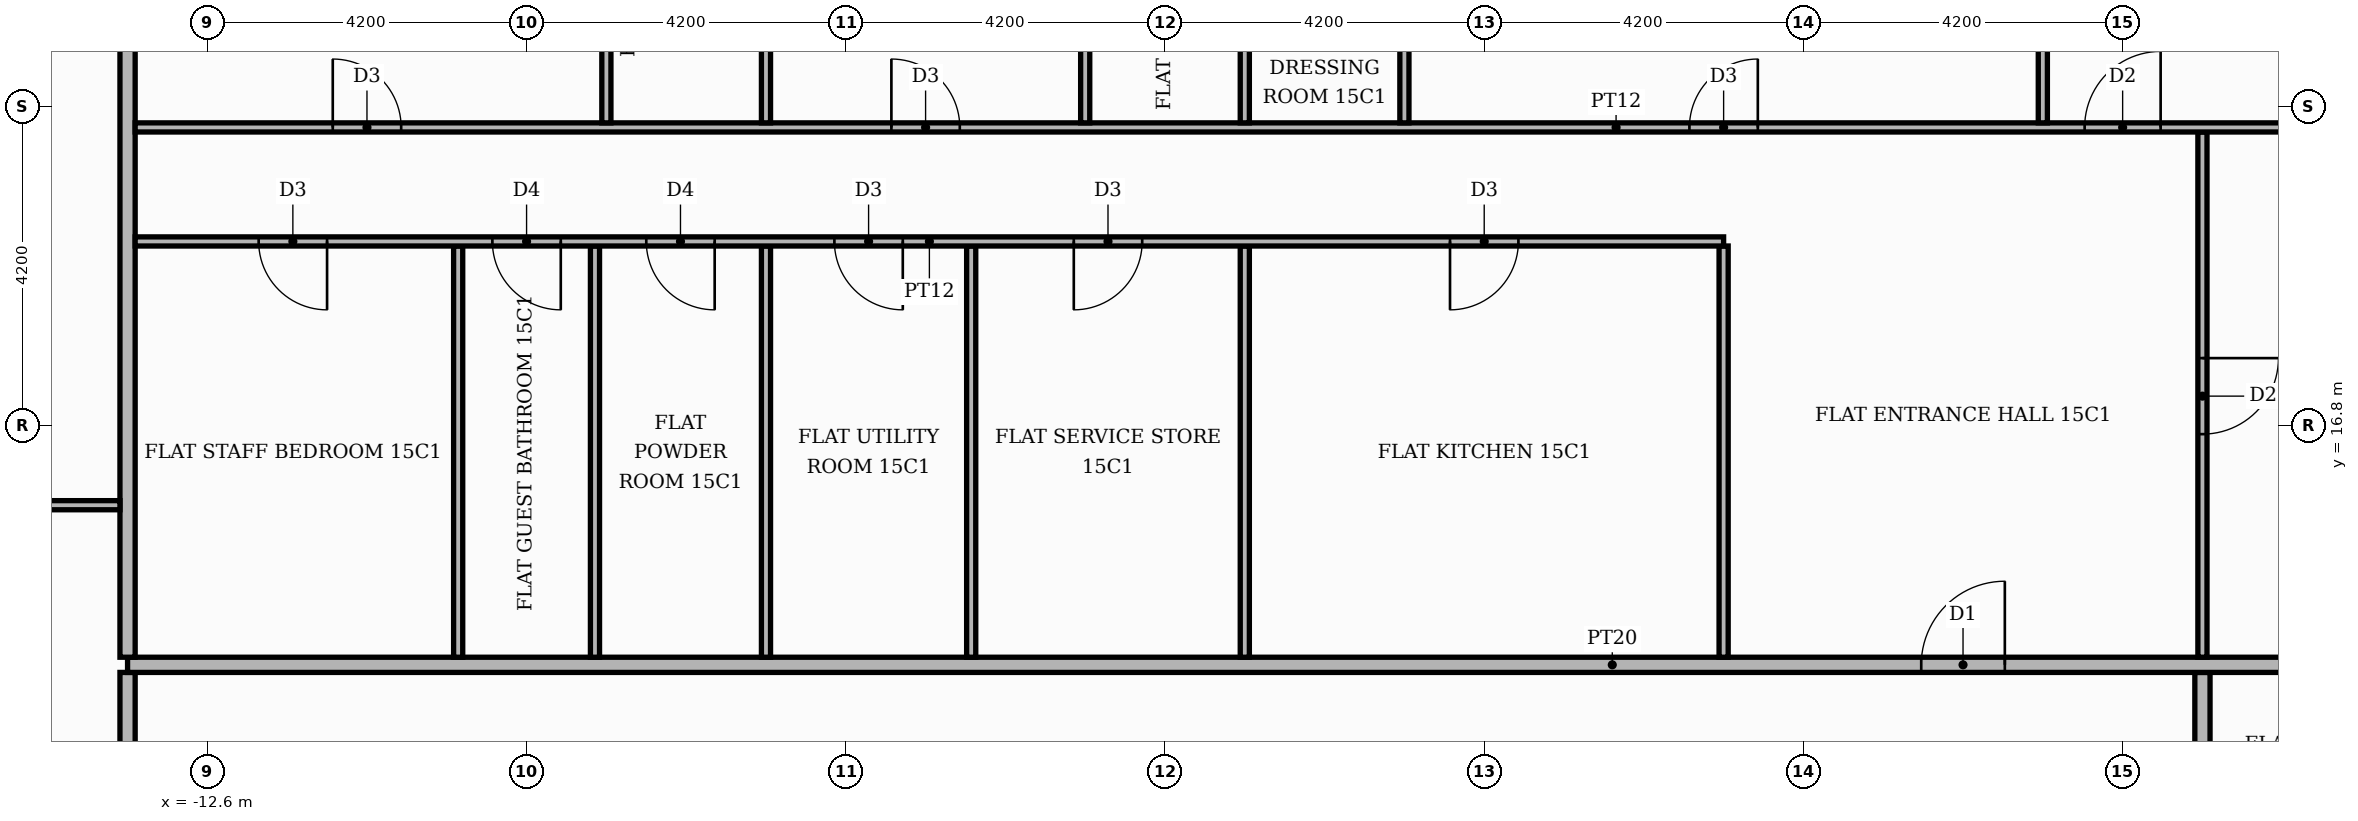
"""IFC4 building model, lengths in metres.
Left out: names, types, materials, properties, quantities, classifications, styles, units other than length and angle.
Written with IfcOpenShell. Run it as: python <this file> out.ifc"""

import sys

from ifc_helpers import new_model, si_unit, direction, frame, frame_2d, origin, place, context, subcontext, project, spatial, rectangle, extrude, element, fill, save


model = new_model("IFC4")
c1 = context("Model", 3, precision=1e-05, world=origin(), true_north=direction((0.0, 1.0)))
c2 = subcontext(c1, "Body", "Model", "MODEL_VIEW")
j1 = project(units=[si_unit("LENGTHUNIT", "METRE"), si_unit("PLANEANGLEUNIT", "RADIAN")], contexts=[c1])
p1 = place(None, origin())
s1 = spatial("IfcSite", under=j1, at=p1, CompositionType="ELEMENT")
p2 = place(p1, origin())
s2 = spatial("IfcBuilding", under=s1, at=p2, CompositionType="ELEMENT")
p3 = place(p2, frame((0.0, 0.0, 66.0)))
s3 = spatial("IfcBuildingStorey", under=s2, at=p3, CompositionType="ELEMENT", Elevation=66.0)
p4 = place(p3, frame((13.65, -5.15, 0.0), z_axis=(0.0, 0.0, 1.0), x_axis=(0.0, 1.0, 0.0)))
e1 = element("IfcWall", 1, at=p4, inside=s3, PredefinedType="PARTITIONING", context=c2, shape_type="SweptSolid", body=[
    extrude(rectangle(XDim=18.7, YDim=0.2, at=frame_2d((9.35, 0.0))), origin(), (0.0, 0.0, 1.0), 3.48),
])
p5 = place(p4, frame((5.65, 0.0, 0.0)))
e2 = element("IfcOpeningElement", 2, at=p5, cuts=e1, PredefinedType="OPENING", context=c2, shape_type="SweptSolid", body=[
    extrude(rectangle(XDim=1.1, YDim=2.4, at=frame_2d((0.55, 1.2))), frame((0.0, 0.11, 0.0), z_axis=(0.0, -1.0, 0.0), x_axis=(1.0, 0.0, 0.0)), (0.0, 0.0, 1.0), 0.22),
])
p6 = place(p3, frame((-13.65, 5.35, 0.0), z_axis=(0.0, 0.0, 1.0), x_axis=(0.0, 1.0, 0.0)))
e3 = element("IfcWall", 3, at=p6, inside=s3, PredefinedType="PARTITIONING", context=c2, shape_type="SweptSolid", body=[
    extrude(rectangle(XDim=8.2, YDim=0.2, at=frame_2d((4.1, 0.0))), origin(), (0.0, 0.0, 1.0), 3.48),
])
p7 = place(p6, frame((5.65, 0.0, 0.0)))
e4 = element("IfcOpeningElement", 4, at=p7, cuts=e3, PredefinedType="OPENING", context=c2, shape_type="SweptSolid", body=[
    extrude(rectangle(XDim=1.1, YDim=2.4, at=frame_2d((0.55, 1.2))), frame((0.0, 0.11, 0.0), z_axis=(0.0, -1.0, 0.0), x_axis=(1.0, 0.0, 0.0)), (0.0, 0.0, 1.0), 0.22),
])
p8 = place(p3, frame((-13.65, 13.65, 0.0), z_axis=(0.0, 0.0, 1.0), x_axis=(1.0, 0.0, 0.0)))
e5 = element("IfcWall", 5, at=p8, inside=s3, PredefinedType="PARTITIONING", context=c2, shape_type="SweptSolid", body=[
    extrude(rectangle(XDim=39.07, YDim=0.2, at=frame_2d((19.535, 0.0))), origin(), (0.0, 0.0, 1.0), 3.48),
])
p9 = place(p8, frame((23.6, 0.0, 0.0)))
e6 = element("IfcOpeningElement", 6, at=p9, cuts=e5, PredefinedType="OPENING", context=c2, shape_type="SweptSolid", body=[
    extrude(rectangle(XDim=1.1, YDim=2.4, at=frame_2d((0.55, 1.2))), frame((0.0, 0.11, 0.0), z_axis=(0.0, -1.0, 0.0), x_axis=(1.0, 0.0, 0.0)), (0.0, 0.0, 1.0), 0.22),
])
p10 = place(p3, frame((-13.65, 13.75, 0.0), z_axis=(0.0, 0.0, 1.0), x_axis=(0.0, 1.0, 0.0)))
e7 = element("IfcWall", 7, at=p10, inside=s3, PredefinedType="PARTITIONING", context=c2, shape_type="SweptSolid", body=[
    extrude(rectangle(XDim=11.67, YDim=0.2, at=frame_2d((5.835, 0.0))), origin(), (0.0, 0.0, 1.0), 3.48),
])
for number, where, z_axis, x_axis in (
    (8, (-9.3, 13.75, 0.0), (0.0, 0.0, 1.0), (0.0, 1.0, 0.0)),
    (9, (-7.5, 13.75, 0.0), (0.0, 0.0, 1.0), (0.0, 1.0, 0.0)),
    (10, (-5.25, 13.75, 0.0), (0.0, 0.0, 1.0), (0.0, 1.0, 0.0)),
    (11, (-2.55, 13.75, 0.0), (0.0, 0.0, 1.0), (0.0, 1.0, 0.0)),
    (12, (1.05, 13.75, 0.0), (0.0, 0.0, 1.0), (0.0, 1.0, 0.0)),
    (13, (7.35, 13.75, 0.0), (0.0, 0.0, 1.0), (0.0, 1.0, 0.0)),
):
    element("IfcWall", number, at=place(p3, frame(where, z_axis=z_axis, x_axis=x_axis)), inside=s3, PredefinedType="PARTITIONING", context=c2, shape_type="SweptSolid", body=[
        extrude(rectangle(XDim=5.41, YDim=0.12, at=frame_2d((2.705, 0.0))), origin(), (0.0, 0.0, 1.0), 3.48),
    ])
p11 = place(p3, frame((13.65, 13.75, 0.0), z_axis=(0.0, 0.0, 1.0), x_axis=(0.0, 1.0, 0.0)))
e14 = element("IfcWall", 14, at=p11, inside=s3, PredefinedType="PARTITIONING", context=c2, shape_type="SweptSolid", body=[
    extrude(rectangle(XDim=6.91, YDim=0.12, at=frame_2d((3.455, 0.0))), origin(), (0.0, 0.0, 1.0), 3.48),
])
p12 = place(p11, frame((2.935, 0.0, 0.0)))
e15 = element("IfcOpeningElement", 15, at=p12, cuts=e14, PredefinedType="OPENING", context=c2, shape_type="SweptSolid", body=[
    extrude(rectangle(XDim=1.0, YDim=2.1, at=frame_2d((0.5, 1.05))), frame((0.0, 0.07, 0.0), z_axis=(0.0, -1.0, 0.0), x_axis=(1.0, 0.0, 0.0)), (0.0, 0.0, 1.0), 0.14),
])
p13 = place(p3, frame((-20.12, 15.75, 0.0), z_axis=(0.0, 0.0, 1.0), x_axis=(1.0, 0.0, 0.0)))
e16 = element("IfcWall", 16, at=p13, inside=s3, PredefinedType="PARTITIONING", context=c2, shape_type="SweptSolid", body=[
    extrude(rectangle(XDim=6.37, YDim=0.12, at=frame_2d((3.185, 0.0))), origin(), (0.0, 0.0, 1.0), 3.48),
])
p14 = place(p13, frame((2.735, 0.0, 0.0)))
e17 = element("IfcOpeningElement", 17, at=p14, cuts=e16, PredefinedType="OPENING", context=c2, shape_type="SweptSolid", body=[
    extrude(rectangle(XDim=1.0, YDim=2.1, at=frame_2d((0.5, 1.05))), frame((0.0, 0.07, 0.0), z_axis=(0.0, -1.0, 0.0), x_axis=(1.0, 0.0, 0.0)), (0.0, 0.0, 1.0), 0.14),
])
p15 = place(p3, frame((-13.55, 19.22, 0.0), z_axis=(0.0, 0.0, 1.0), x_axis=(1.0, 0.0, 0.0)))
e18 = element("IfcWall", 18, at=p15, inside=s3, PredefinedType="PARTITIONING", context=c2, shape_type="SweptSolid", body=[
    extrude(rectangle(XDim=20.9, YDim=0.12, at=frame_2d((10.45, 0.0))), origin(), (0.0, 0.0, 1.0), 3.48),
])
p16 = place(p15, frame((17.3, 0.0, 0.0)))
e19 = element("IfcOpeningElement", 19, at=p16, cuts=e18, PredefinedType="OPENING", context=c2, shape_type="SweptSolid", body=[
    extrude(rectangle(XDim=0.9, YDim=2.1, at=frame_2d((0.45, 1.05))), frame((0.0, 0.07, 0.0), z_axis=(0.0, -1.0, 0.0), x_axis=(1.0, 0.0, 0.0)), (0.0, 0.0, 1.0), 0.14),
])
p17 = place(p15, frame((12.35, 0.0, 0.0)))
e20 = element("IfcOpeningElement", 20, at=p17, cuts=e18, PredefinedType="OPENING", context=c2, shape_type="SweptSolid", body=[
    extrude(rectangle(XDim=0.9, YDim=2.1, at=frame_2d((0.45, 1.05))), frame((0.0, 0.07, 0.0), z_axis=(0.0, -1.0, 0.0), x_axis=(1.0, 0.0, 0.0)), (0.0, 0.0, 1.0), 0.14),
])
p18 = place(p15, frame((9.2, 0.0, 0.0)))
e21 = element("IfcOpeningElement", 21, at=p18, cuts=e18, PredefinedType="OPENING", context=c2, shape_type="SweptSolid", body=[
    extrude(rectangle(XDim=0.9, YDim=2.1, at=frame_2d((0.45, 1.05))), frame((0.0, 0.07, 0.0), z_axis=(0.0, -1.0, 0.0), x_axis=(1.0, 0.0, 0.0)), (0.0, 0.0, 1.0), 0.14),
])
p19 = place(p15, frame((6.725, 0.0, 0.0)))
e22 = element("IfcOpeningElement", 22, at=p19, cuts=e18, PredefinedType="OPENING", context=c2, shape_type="SweptSolid", body=[
    extrude(rectangle(XDim=0.9, YDim=2.1, at=frame_2d((0.45, 1.05))), frame((0.0, 0.07, 0.0), z_axis=(0.0, -1.0, 0.0), x_axis=(1.0, 0.0, 0.0)), (0.0, 0.0, 1.0), 0.14),
])
p20 = place(p15, frame((4.7, 0.0, 0.0)))
e23 = element("IfcOpeningElement", 23, at=p20, cuts=e18, PredefinedType="OPENING", context=c2, shape_type="SweptSolid", body=[
    extrude(rectangle(XDim=0.9, YDim=2.1, at=frame_2d((0.45, 1.05))), frame((0.0, 0.07, 0.0), z_axis=(0.0, -1.0, 0.0), x_axis=(1.0, 0.0, 0.0)), (0.0, 0.0, 1.0), 0.14),
])
p21 = place(p15, frame((1.625, 0.0, 0.0)))
e24 = element("IfcOpeningElement", 24, at=p21, cuts=e18, PredefinedType="OPENING", context=c2, shape_type="SweptSolid", body=[
    extrude(rectangle(XDim=0.9, YDim=2.1, at=frame_2d((0.45, 1.05))), frame((0.0, 0.07, 0.0), z_axis=(0.0, -1.0, 0.0), x_axis=(1.0, 0.0, 0.0)), (0.0, 0.0, 1.0), 0.14),
])
p22 = place(p3, frame((-13.55, 20.72, 0.0), z_axis=(0.0, 0.0, 1.0), x_axis=(1.0, 0.0, 0.0)))
e25 = element("IfcWall", 25, at=p22, inside=s3, PredefinedType="PARTITIONING", context=c2, shape_type="SweptSolid", body=[
    extrude(rectangle(XDim=38.97, YDim=0.12, at=frame_2d((19.485, 0.0))), origin(), (0.0, 0.0, 1.0), 3.48),
])
p23 = place(p22, frame((25.65, 0.0, 0.0)))
e26 = element("IfcOpeningElement", 26, at=p23, cuts=e25, PredefinedType="OPENING", context=c2, shape_type="SweptSolid", body=[
    extrude(rectangle(XDim=1.0, YDim=2.1, at=frame_2d((0.5, 1.05))), frame((0.0, 0.07, 0.0), z_axis=(0.0, -1.0, 0.0), x_axis=(1.0, 0.0, 0.0)), (0.0, 0.0, 1.0), 0.14),
])
p24 = place(p22, frame((20.45, 0.0, 0.0)))
e27 = element("IfcOpeningElement", 27, at=p24, cuts=e25, PredefinedType="OPENING", context=c2, shape_type="SweptSolid", body=[
    extrude(rectangle(XDim=0.9, YDim=2.1, at=frame_2d((0.45, 1.05))), frame((0.0, 0.07, 0.0), z_axis=(0.0, -1.0, 0.0), x_axis=(1.0, 0.0, 0.0)), (0.0, 0.0, 1.0), 0.14),
])
p25 = place(p22, frame((9.95, 0.0, 0.0)))
e28 = element("IfcOpeningElement", 28, at=p25, cuts=e25, PredefinedType="OPENING", context=c2, shape_type="SweptSolid", body=[
    extrude(rectangle(XDim=0.9, YDim=2.1, at=frame_2d((0.45, 1.05))), frame((0.0, 0.07, 0.0), z_axis=(0.0, -1.0, 0.0), x_axis=(1.0, 0.0, 0.0)), (0.0, 0.0, 1.0), 0.14),
])
p26 = place(p22, frame((2.6, 0.0, 0.0)))
e29 = element("IfcOpeningElement", 29, at=p26, cuts=e25, PredefinedType="OPENING", context=c2, shape_type="SweptSolid", body=[
    extrude(rectangle(XDim=0.9, YDim=2.1, at=frame_2d((0.45, 1.05))), frame((0.0, 0.07, 0.0), z_axis=(0.0, -1.0, 0.0), x_axis=(1.0, 0.0, 0.0)), (0.0, 0.0, 1.0), 0.14),
])
p27 = place(p3, frame((-7.35, 20.78, 0.0), z_axis=(0.0, 0.0, 1.0), x_axis=(0.0, 1.0, 0.0)))
e30 = element("IfcWall", 30, at=p27, inside=s3, PredefinedType="PARTITIONING", context=c2, shape_type="SweptSolid", body=[
    extrude(rectangle(XDim=4.64, YDim=0.12, at=frame_2d((2.32, 0.0))), origin(), (0.0, 0.0, 1.0), 3.48),
])
p28 = place(p3, frame((-5.25, 20.78, 0.0), z_axis=(0.0, 0.0, 1.0), x_axis=(0.0, 1.0, 0.0)))
e31 = element("IfcWall", 31, at=p28, inside=s3, PredefinedType="PARTITIONING", context=c2, shape_type="SweptSolid", body=[
    extrude(rectangle(XDim=4.64, YDim=0.12, at=frame_2d((2.32, 0.0))), origin(), (0.0, 0.0, 1.0), 3.48),
])
p29 = place(p28, frame((1.99, 0.0, 0.0)))
e32 = element("IfcOpeningElement", 32, at=p29, cuts=e31, PredefinedType="OPENING", context=c2, shape_type="SweptSolid", body=[
    extrude(rectangle(XDim=0.9, YDim=2.1, at=frame_2d((0.45, 1.05))), frame((0.0, 0.07, 0.0), z_axis=(0.0, -1.0, 0.0), x_axis=(1.0, 0.0, 0.0)), (0.0, 0.0, 1.0), 0.14),
])
p30 = place(p3, frame((-1.05, 20.78, 0.0), z_axis=(0.0, 0.0, 1.0), x_axis=(0.0, 1.0, 0.0)))
e33 = element("IfcWall", 33, at=p30, inside=s3, PredefinedType="PARTITIONING", context=c2, shape_type="SweptSolid", body=[
    extrude(rectangle(XDim=4.64, YDim=0.12, at=frame_2d((2.32, 0.0))), origin(), (0.0, 0.0, 1.0), 3.48),
])
p31 = place(p3, frame((1.05, 20.78, 0.0), z_axis=(0.0, 0.0, 1.0), x_axis=(0.0, 1.0, 0.0)))
e34 = element("IfcWall", 34, at=p31, inside=s3, PredefinedType="PARTITIONING", context=c2, shape_type="SweptSolid", body=[
    extrude(rectangle(XDim=4.64, YDim=0.12, at=frame_2d((2.32, 0.0))), origin(), (0.0, 0.0, 1.0), 3.48),
])
p32 = place(p31, frame((1.99, 0.0, 0.0)))
e35 = element("IfcOpeningElement", 35, at=p32, cuts=e34, PredefinedType="OPENING", context=c2, shape_type="SweptSolid", body=[
    extrude(rectangle(XDim=0.9, YDim=2.1, at=frame_2d((0.45, 1.05))), frame((0.0, 0.07, 0.0), z_axis=(0.0, -1.0, 0.0), x_axis=(1.0, 0.0, 0.0)), (0.0, 0.0, 1.0), 0.14),
])
p33 = place(p3, frame((3.15, 20.78, 0.0), z_axis=(0.0, 0.0, 1.0), x_axis=(0.0, 1.0, 0.0)))
e36 = element("IfcWall", 36, at=p33, inside=s3, PredefinedType="PARTITIONING", context=c2, shape_type="SweptSolid", body=[
    extrude(rectangle(XDim=4.64, YDim=0.12, at=frame_2d((2.32, 0.0))), origin(), (0.0, 0.0, 1.0), 3.48),
])
p34 = place(p33, frame((1.99, 0.0, 0.0)))
e37 = element("IfcOpeningElement", 37, at=p34, cuts=e36, PredefinedType="OPENING", context=c2, shape_type="SweptSolid", body=[
    extrude(rectangle(XDim=0.9, YDim=2.1, at=frame_2d((0.45, 1.05))), frame((0.0, 0.07, 0.0), z_axis=(0.0, -1.0, 0.0), x_axis=(1.0, 0.0, 0.0)), (0.0, 0.0, 1.0), 0.14),
])
p35 = place(p3, frame((11.55, 20.78, 0.0), z_axis=(0.0, 0.0, 1.0), x_axis=(0.0, 1.0, 0.0)))
e38 = element("IfcWall", 38, at=p35, inside=s3, PredefinedType="PARTITIONING", context=c2, shape_type="SweptSolid", body=[
    extrude(rectangle(XDim=4.64, YDim=0.12, at=frame_2d((2.32, 0.0))), origin(), (0.0, 0.0, 1.0), 3.48),
])
p36 = place(p9, origin())
e39 = element("IfcDoor", 39, at=p36, inside=s3, OperationType="SINGLE_SWING_RIGHT", PredefinedType="DOOR", context=c2, shape_type="SweptSolid", body=[
    extrude(rectangle(XDim=1.1, YDim=2.4, at=frame_2d((0.55, 1.2))), frame((0.0, 0.025, 0.0), z_axis=(0.0, -1.0, 0.0), x_axis=(1.0, 0.0, 0.0)), (0.0, 0.0, 1.0), 0.05),
])
fill(e6, e39)
p37 = place(p12, frame((1.0, 0.0, 0.0), z_axis=(0.0, 0.0, 1.0), x_axis=(-1.0, 0.0, 0.0)))
e40 = element("IfcDoor", 40, at=p37, inside=s3, OperationType="SINGLE_SWING_RIGHT", PredefinedType="DOOR", context=c2, shape_type="SweptSolid", body=[
    extrude(rectangle(XDim=1.0, YDim=2.1, at=frame_2d((0.5, 1.05))), frame((0.0, 0.025, 0.0), z_axis=(0.0, -1.0, 0.0), x_axis=(1.0, 0.0, 0.0)), (0.0, 0.0, 1.0), 0.05),
])
fill(e15, e40)
p38 = place(p16, frame((0.9, 0.0, 0.0), z_axis=(0.0, 0.0, 1.0), x_axis=(-1.0, 0.0, 0.0)))
e41 = element("IfcDoor", 41, at=p38, inside=s3, OperationType="SINGLE_SWING_LEFT", PredefinedType="DOOR", context=c2, shape_type="SweptSolid", body=[
    extrude(rectangle(XDim=0.9, YDim=2.1, at=frame_2d((0.45, 1.05))), frame((0.0, 0.025, 0.0), z_axis=(0.0, -1.0, 0.0), x_axis=(1.0, 0.0, 0.0)), (0.0, 0.0, 1.0), 0.05),
])
fill(e19, e41)
p39 = place(p17, frame((0.9, 0.0, 0.0), z_axis=(0.0, 0.0, 1.0), x_axis=(-1.0, 0.0, 0.0)))
e42 = element("IfcDoor", 42, at=p39, inside=s3, OperationType="SINGLE_SWING_LEFT", PredefinedType="DOOR", context=c2, shape_type="SweptSolid", body=[
    extrude(rectangle(XDim=0.9, YDim=2.1, at=frame_2d((0.45, 1.05))), frame((0.0, 0.025, 0.0), z_axis=(0.0, -1.0, 0.0), x_axis=(1.0, 0.0, 0.0)), (0.0, 0.0, 1.0), 0.05),
])
fill(e20, e42)
p40 = place(p18, frame((0.9, 0.0, 0.0), z_axis=(0.0, 0.0, 1.0), x_axis=(-1.0, 0.0, 0.0)))
e43 = element("IfcDoor", 43, at=p40, inside=s3, OperationType="SINGLE_SWING_RIGHT", PredefinedType="DOOR", context=c2, shape_type="SweptSolid", body=[
    extrude(rectangle(XDim=0.9, YDim=2.1, at=frame_2d((0.45, 1.05))), frame((0.0, 0.025, 0.0), z_axis=(0.0, -1.0, 0.0), x_axis=(1.0, 0.0, 0.0)), (0.0, 0.0, 1.0), 0.05),
])
fill(e21, e43)
p41 = place(p19, frame((0.9, 0.0, 0.0), z_axis=(0.0, 0.0, 1.0), x_axis=(-1.0, 0.0, 0.0)))
e44 = element("IfcDoor", 44, at=p41, inside=s3, OperationType="SINGLE_SWING_RIGHT", PredefinedType="DOOR", context=c2, shape_type="SweptSolid", body=[
    extrude(rectangle(XDim=0.9, YDim=2.1, at=frame_2d((0.45, 1.05))), frame((0.0, 0.025, 0.0), z_axis=(0.0, -1.0, 0.0), x_axis=(1.0, 0.0, 0.0)), (0.0, 0.0, 1.0), 0.05),
])
fill(e22, e44)
p42 = place(p20, frame((0.9, 0.0, 0.0), z_axis=(0.0, 0.0, 1.0), x_axis=(-1.0, 0.0, 0.0)))
e45 = element("IfcDoor", 45, at=p42, inside=s3, OperationType="SINGLE_SWING_RIGHT", PredefinedType="DOOR", context=c2, shape_type="SweptSolid", body=[
    extrude(rectangle(XDim=0.9, YDim=2.1, at=frame_2d((0.45, 1.05))), frame((0.0, 0.025, 0.0), z_axis=(0.0, -1.0, 0.0), x_axis=(1.0, 0.0, 0.0)), (0.0, 0.0, 1.0), 0.05),
])
fill(e23, e45)
p43 = place(p21, frame((0.9, 0.0, 0.0), z_axis=(0.0, 0.0, 1.0), x_axis=(-1.0, 0.0, 0.0)))
e46 = element("IfcDoor", 46, at=p43, inside=s3, OperationType="SINGLE_SWING_RIGHT", PredefinedType="DOOR", context=c2, shape_type="SweptSolid", body=[
    extrude(rectangle(XDim=0.9, YDim=2.1, at=frame_2d((0.45, 1.05))), frame((0.0, 0.025, 0.0), z_axis=(0.0, -1.0, 0.0), x_axis=(1.0, 0.0, 0.0)), (0.0, 0.0, 1.0), 0.05),
])
fill(e24, e46)
p44 = place(p23, origin())
e47 = element("IfcDoor", 47, at=p44, inside=s3, OperationType="SINGLE_SWING_RIGHT", PredefinedType="DOOR", context=c2, shape_type="SweptSolid", body=[
    extrude(rectangle(XDim=1.0, YDim=2.1, at=frame_2d((0.5, 1.05))), frame((0.0, 0.025, 0.0), z_axis=(0.0, -1.0, 0.0), x_axis=(1.0, 0.0, 0.0)), (0.0, 0.0, 1.0), 0.05),
])
fill(e26, e47)
p45 = place(p24, origin())
e48 = element("IfcDoor", 48, at=p45, inside=s3, OperationType="SINGLE_SWING_RIGHT", PredefinedType="DOOR", context=c2, shape_type="SweptSolid", body=[
    extrude(rectangle(XDim=0.9, YDim=2.1, at=frame_2d((0.45, 1.05))), frame((0.0, 0.025, 0.0), z_axis=(0.0, -1.0, 0.0), x_axis=(1.0, 0.0, 0.0)), (0.0, 0.0, 1.0), 0.05),
])
fill(e27, e48)
p46 = place(p25, origin())
e49 = element("IfcDoor", 49, at=p46, inside=s3, OperationType="SINGLE_SWING_LEFT", PredefinedType="DOOR", context=c2, shape_type="SweptSolid", body=[
    extrude(rectangle(XDim=0.9, YDim=2.1, at=frame_2d((0.45, 1.05))), frame((0.0, 0.025, 0.0), z_axis=(0.0, -1.0, 0.0), x_axis=(1.0, 0.0, 0.0)), (0.0, 0.0, 1.0), 0.05),
])
fill(e28, e49)
p47 = place(p26, origin())
e50 = element("IfcDoor", 50, at=p47, inside=s3, OperationType="SINGLE_SWING_LEFT", PredefinedType="DOOR", context=c2, shape_type="SweptSolid", body=[
    extrude(rectangle(XDim=0.9, YDim=2.1, at=frame_2d((0.45, 1.05))), frame((0.0, 0.025, 0.0), z_axis=(0.0, -1.0, 0.0), x_axis=(1.0, 0.0, 0.0)), (0.0, 0.0, 1.0), 0.05),
])
fill(e29, e50)
save(model, sys.argv[1])
